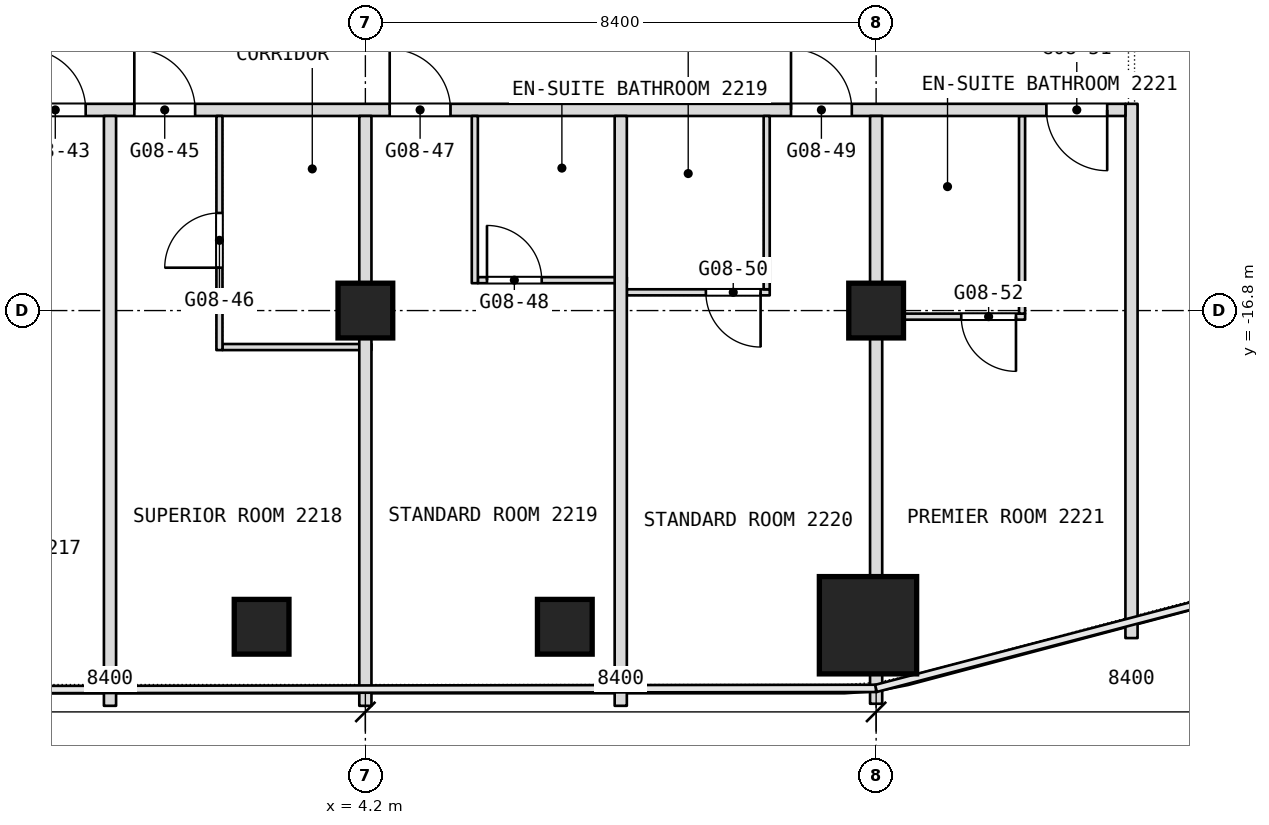
"""IFC4 building model, lengths in metres.
Left out: names, types, materials, properties, quantities, classifications, styles, units other than length and angle.
Written with IfcOpenShell. Run it as: python <this file> out.ifc"""

import sys

from ifc_helpers import new_model, si_unit, direction, frame, frame_2d, origin, origin_2d, place, context, subcontext, project, spatial, rectangle, extrude, element, fill, save


model = new_model("IFC4")
c1 = context("Model", 3, precision=1e-05, world=origin(), true_north=direction((0.0, 1.0)))
c2 = subcontext(c1, "Body", "Model", "MODEL_VIEW")
j1 = project(units=[si_unit("LENGTHUNIT", "METRE"), si_unit("PLANEANGLEUNIT", "RADIAN")], contexts=[c1])
p1 = place(None, origin())
s1 = spatial("IfcSite", under=j1, at=p1, CompositionType="ELEMENT")
p2 = place(p1, origin())
s2 = spatial("IfcBuilding", under=s1, at=p2, CompositionType="ELEMENT")
p3 = place(p2, frame((0.0, 0.0, 104.9)))
s3 = spatial("IfcBuildingStorey", under=s2, at=p3, CompositionType="ELEMENT", Elevation=104.9)
p4 = place(p3, frame((12.466, -21.975, 0.0), z_axis=(0.0, 0.0, 1.0), x_axis=(1.0, 0.0, 0.0)))
e1 = element("IfcColumn", 1, at=p4, inside=s3, PredefinedType="COLUMN", context=c2, shape_type="SweptSolid", body=[
    extrude(rectangle(XDim=1.6, YDim=1.6, at=origin_2d()), origin(), (0.0, 0.0, 1.0), 3.6),
])
for number, where, z_axis, x_axis in (
    (2, (4.2, -16.8, 0.0), (0.0, 0.0, 1.0), (1.0, 0.0, 0.0)),
    (3, (12.6, -16.8, 0.0), (0.0, 0.0, 1.0), (1.0, 0.0, 0.0)),
    (4, (7.48, -22.0, 0.0), (0.0, 0.0, 1.0), (1.0, 0.0, 0.0)),
    (5, (2.493, -22.0, 0.0), (0.0, 0.0, 1.0), (1.0, 0.0, 0.0)),
):
    element("IfcColumn", number, at=place(p3, frame(where, z_axis=z_axis, x_axis=x_axis)), inside=s3, PredefinedType="COLUMN", context=c2, shape_type="SweptSolid", body=[
        extrude(rectangle(XDim=0.9, YDim=0.9, at=origin_2d()), origin(), (0.0, 0.0, 1.0), 3.6),
    ])
p5 = place(p3, frame((1.85, -17.4, 0.0), z_axis=(0.0, 0.0, 1.0), x_axis=(1.0, 0.0, 0.0)))
e6 = element("IfcWall", 6, at=p5, inside=s3, PredefinedType="PARTITIONING", context=c2, shape_type="SweptSolid", body=[
    extrude(rectangle(XDim=2.45, YDim=0.1, at=frame_2d((1.225, 0.0))), origin(), (0.0, 0.0, 1.0), 3.34),
])
p6 = place(p3, frame((12.7, -16.9, 0.0), z_axis=(0.0, 0.0, 1.0), x_axis=(1.0, 0.0, 0.0)))
e7 = element("IfcWall", 7, at=p6, inside=s3, PredefinedType="PARTITIONING", context=c2, shape_type="SweptSolid", body=[
    extrude(rectangle(XDim=2.35, YDim=0.1, at=frame_2d((1.175, 0.0))), origin(), (0.0, 0.0, 1.0), 2.89),
])
p7 = place(p6, frame((1.3, 0.0, 0.0)))
e8 = element("IfcOpeningElement", 8, at=p7, cuts=e7, PredefinedType="OPENING", context=c2, shape_type="SweptSolid", body=[
    extrude(rectangle(XDim=0.9, YDim=2.1, at=frame_2d((0.45, 1.05))), frame((0.0, 0.05, 0.0), z_axis=(0.0, -1.0, 0.0), x_axis=(1.0, 0.0, 0.0)), (0.0, 0.0, 1.0), 0.1),
])
p8 = place(p3, frame((16.8, -22.186, 0.0), z_axis=(0.0, 0.0, 1.0), x_axis=(0.0, 1.0, 0.0)))
e9 = element("IfcWall", 9, at=p8, inside=s3, PredefinedType="PARTITIONING", context=c2, shape_type="SweptSolid", body=[
    extrude(rectangle(XDim=8.786, YDim=0.2, at=frame_2d((4.393, 0.0))), origin(), (0.0, 0.0, 1.0), 3.34),
])
p9 = place(p3, frame((8.5, -16.5, 0.0), z_axis=(0.0, 0.0, 1.0), x_axis=(1.0, 0.0, 0.0)))
e10 = element("IfcWall", 10, at=p9, inside=s3, PredefinedType="PARTITIONING", context=c2, shape_type="SweptSolid", body=[
    extrude(rectangle(XDim=2.35, YDim=0.1, at=frame_2d((1.175, 0.0))), origin(), (0.0, 0.0, 1.0), 3.34),
])
p10 = place(p9, frame((1.3, 0.0, 0.0)))
e11 = element("IfcOpeningElement", 11, at=p10, cuts=e10, PredefinedType="OPENING", context=c2, shape_type="SweptSolid", body=[
    extrude(rectangle(XDim=0.9, YDim=2.1, at=frame_2d((0.45, 1.05))), frame((0.0, 0.05, 0.0), z_axis=(0.0, -1.0, 0.0), x_axis=(1.0, 0.0, 0.0)), (0.0, 0.0, 1.0), 0.1),
])
p11 = place(p3, frame((6.05, -16.3, 0.0), z_axis=(0.0, 0.0, 1.0), x_axis=(1.0, 0.0, 0.0)))
e12 = element("IfcWall", 12, at=p11, inside=s3, PredefinedType="PARTITIONING", context=c2, shape_type="SweptSolid", body=[
    extrude(rectangle(XDim=2.45, YDim=0.1, at=frame_2d((1.225, 0.0))), origin(), (0.0, 0.0, 1.0), 3.34),
])
p12 = place(p11, frame((0.15, 0.0, 0.0)))
e13 = element("IfcOpeningElement", 13, at=p12, cuts=e12, PredefinedType="OPENING", context=c2, shape_type="SweptSolid", body=[
    extrude(rectangle(XDim=0.9, YDim=2.1, at=frame_2d((0.45, 1.05))), frame((0.0, 0.05, 0.0), z_axis=(0.0, -1.0, 0.0), x_axis=(1.0, 0.0, 0.0)), (0.0, 0.0, 1.0), 0.1),
])
p13 = place(p3, frame((15.0, -16.85, 0.0), z_axis=(0.0, 0.0, 1.0), x_axis=(0.0, 1.0, 0.0)))
e14 = element("IfcWall", 14, at=p13, inside=s3, PredefinedType="PARTITIONING", context=c2, shape_type="SweptSolid", body=[
    extrude(rectangle(XDim=3.25, YDim=0.1, at=frame_2d((1.625, 0.0))), origin(), (0.0, 0.0, 1.0), 3.34),
])
p14 = place(p3, frame((-3.2, -13.5, 0.0), z_axis=(0.0, 0.0, 1.0), x_axis=(1.0, 0.0, 0.0)))
e15 = element("IfcWall", 15, at=p14, inside=s3, PredefinedType="PARTITIONING", context=c2, shape_type="SweptSolid", body=[
    extrude(rectangle(XDim=19.9, YDim=0.2, at=frame_2d((9.95, 0.0))), origin(), (0.0, 0.0, 1.0), 3.34),
])
p15 = place(p14, frame((1.8, 0.0, 0.0)))
e16 = element("IfcOpeningElement", 16, at=p15, cuts=e15, PredefinedType="OPENING", context=c2, shape_type="SweptSolid", body=[
    extrude(rectangle(XDim=1.0, YDim=2.1, at=frame_2d((0.5, 1.05))), frame((0.0, 0.1, 0.0), z_axis=(0.0, -1.0, 0.0), x_axis=(1.0, 0.0, 0.0)), (0.0, 0.0, 1.0), 0.2),
])
p16 = place(p14, frame((3.6, 0.0, 0.0)))
e17 = element("IfcOpeningElement", 17, at=p16, cuts=e15, PredefinedType="OPENING", context=c2, shape_type="SweptSolid", body=[
    extrude(rectangle(XDim=1.0, YDim=2.1, at=frame_2d((0.5, 1.05))), frame((0.0, 0.1, 0.0), z_axis=(0.0, -1.0, 0.0), x_axis=(1.0, 0.0, 0.0)), (0.0, 0.0, 1.0), 0.2),
])
p17 = place(p14, frame((7.8, 0.0, 0.0)))
e18 = element("IfcOpeningElement", 18, at=p17, cuts=e15, PredefinedType="OPENING", context=c2, shape_type="SweptSolid", body=[
    extrude(rectangle(XDim=1.0, YDim=2.1, at=frame_2d((0.5, 1.05))), frame((0.0, 0.1, 0.0), z_axis=(0.0, -1.0, 0.0), x_axis=(1.0, 0.0, 0.0)), (0.0, 0.0, 1.0), 0.2),
])
p18 = place(p14, frame((14.4, 0.0, 0.0)))
e19 = element("IfcOpeningElement", 19, at=p18, cuts=e15, PredefinedType="OPENING", context=c2, shape_type="SweptSolid", body=[
    extrude(rectangle(XDim=1.0, YDim=2.1, at=frame_2d((0.5, 1.05))), frame((0.0, 0.1, 0.0), z_axis=(0.0, -1.0, 0.0), x_axis=(1.0, 0.0, 0.0)), (0.0, 0.0, 1.0), 0.2),
])
p19 = place(p14, frame((18.6, 0.0, 0.0)))
e20 = element("IfcOpeningElement", 20, at=p19, cuts=e15, PredefinedType="OPENING", context=c2, shape_type="SweptSolid", body=[
    extrude(rectangle(XDim=1.0, YDim=2.1, at=frame_2d((0.5, 1.05))), frame((0.0, 0.1, 0.0), z_axis=(0.0, -1.0, 0.0), x_axis=(1.0, 0.0, 0.0)), (0.0, 0.0, 1.0), 0.2),
])
p20 = place(p3, frame((12.6, -23.266, 0.0), z_axis=(0.0, 0.0, 1.0), x_axis=(0.0, 1.0, 0.0)))
e21 = element("IfcWall", 21, at=p20, inside=s3, PredefinedType="PARTITIONING", context=c2, shape_type="SweptSolid", body=[
    extrude(rectangle(XDim=0.491, YDim=0.2, at=frame_2d((0.246, 0.0))), origin(), (0.0, 0.0, 1.0), 3.34),
])
p21 = place(p3, frame((12.6, -21.175, 0.0), z_axis=(0.0, 0.0, 1.0), x_axis=(0.0, 1.0, 0.0)))
e22 = element("IfcWall", 22, at=p21, inside=s3, PredefinedType="PARTITIONING", context=c2, shape_type="SweptSolid", body=[
    extrude(rectangle(XDim=7.575, YDim=0.2, at=frame_2d((3.788, 0.0))), origin(), (0.0, 0.0, 1.0), 3.34),
])
p22 = place(p3, frame((10.8, -16.45, 0.0), z_axis=(0.0, 0.0, 1.0), x_axis=(0.0, 1.0, 0.0)))
e23 = element("IfcWall", 23, at=p22, inside=s3, PredefinedType="PARTITIONING", context=c2, shape_type="SweptSolid", body=[
    extrude(rectangle(XDim=2.85, YDim=0.1, at=frame_2d((1.425, 0.0))), origin(), (0.0, 0.0, 1.0), 3.34),
])
p23 = place(p3, frame((8.4, -23.3, 0.0), z_axis=(0.0, 0.0, 1.0), x_axis=(0.0, 1.0, 0.0)))
e24 = element("IfcWall", 24, at=p23, inside=s3, PredefinedType="PARTITIONING", context=c2, shape_type="SweptSolid", body=[
    extrude(rectangle(XDim=9.7, YDim=0.2, at=frame_2d((4.85, 0.0))), origin(), (0.0, 0.0, 1.0), 3.34),
])
p24 = place(p3, frame((6.0, -16.35, 0.0), z_axis=(0.0, 0.0, 1.0), x_axis=(0.0, 1.0, 0.0)))
e25 = element("IfcWall", 25, at=p24, inside=s3, PredefinedType="PARTITIONING", context=c2, shape_type="SweptSolid", body=[
    extrude(rectangle(XDim=2.75, YDim=0.1, at=frame_2d((1.375, 0.0))), origin(), (0.0, 0.0, 1.0), 3.34),
])
p25 = place(p3, frame((4.2, -23.3, 0.0), z_axis=(0.0, 0.0, 1.0), x_axis=(0.0, 1.0, 0.0)))
e26 = element("IfcWall", 26, at=p25, inside=s3, PredefinedType="PARTITIONING", context=c2, shape_type="SweptSolid", body=[
    extrude(rectangle(XDim=9.7, YDim=0.2, at=frame_2d((4.85, 0.0))), origin(), (0.0, 0.0, 1.0), 3.34),
])
p26 = place(p3, frame((1.8, -17.45, 0.0), z_axis=(0.0, 0.0, 1.0), x_axis=(0.0, 1.0, 0.0)))
e27 = element("IfcWall", 27, at=p26, inside=s3, PredefinedType="PARTITIONING", context=c2, shape_type="SweptSolid", body=[
    extrude(rectangle(XDim=3.85, YDim=0.1, at=frame_2d((1.925, 0.0))), origin(), (0.0, 0.0, 1.0), 3.34),
])
p27 = place(p26, frame((1.355, 0.0, 0.0)))
e28 = element("IfcOpeningElement", 28, at=p27, cuts=e27, PredefinedType="OPENING", context=c2, shape_type="SweptSolid", body=[
    extrude(rectangle(XDim=0.9, YDim=2.1, at=frame_2d((0.45, 1.05))), frame((0.0, 0.05, 0.0), z_axis=(0.0, -1.0, 0.0), x_axis=(1.0, 0.0, 0.0)), (0.0, 0.0, 1.0), 0.1),
])
p28 = place(p3, frame((0.0, -23.3, 0.0), z_axis=(0.0, 0.0, 1.0), x_axis=(0.0, 1.0, 0.0)))
e29 = element("IfcWall", 29, at=p28, inside=s3, PredefinedType="PARTITIONING", context=c2, shape_type="SweptSolid", body=[
    extrude(rectangle(XDim=9.7, YDim=0.2, at=frame_2d((4.85, 0.0))), origin(), (0.0, 0.0, 1.0), 3.34),
])
p29 = place(p7, origin())
e30 = element("IfcDoor", 30, at=p29, inside=s3, OperationType="SINGLE_SWING_RIGHT", PredefinedType="DOOR", context=c2, shape_type="SweptSolid", body=[
    extrude(rectangle(XDim=0.9, YDim=2.1, at=frame_2d((0.45, 1.05))), frame((0.0, 0.025, 0.0), z_axis=(0.0, -1.0, 0.0), x_axis=(1.0, 0.0, 0.0)), (0.0, 0.0, 1.0), 0.05),
])
fill(e8, e30)
p30 = place(p10, origin())
e31 = element("IfcDoor", 31, at=p30, inside=s3, OperationType="SINGLE_SWING_RIGHT", PredefinedType="DOOR", context=c2, shape_type="SweptSolid", body=[
    extrude(rectangle(XDim=0.9, YDim=2.1, at=frame_2d((0.45, 1.05))), frame((0.0, 0.025, 0.0), z_axis=(0.0, -1.0, 0.0), x_axis=(1.0, 0.0, 0.0)), (0.0, 0.0, 1.0), 0.05),
])
fill(e11, e31)
p31 = place(p12, origin())
e32 = element("IfcDoor", 32, at=p31, inside=s3, OperationType="SINGLE_SWING_LEFT", PredefinedType="DOOR", context=c2, shape_type="SweptSolid", body=[
    extrude(rectangle(XDim=0.9, YDim=2.1, at=frame_2d((0.45, 1.05))), frame((0.0, 0.025, 0.0), z_axis=(0.0, -1.0, 0.0), x_axis=(1.0, 0.0, 0.0)), (0.0, 0.0, 1.0), 0.05),
])
fill(e13, e32)
p32 = place(p15, origin())
e33 = element("IfcDoor", 33, at=p32, inside=s3, OperationType="SINGLE_SWING_LEFT", PredefinedType="DOOR", context=c2, shape_type="SweptSolid", body=[
    extrude(rectangle(XDim=1.0, YDim=2.1, at=frame_2d((0.5, 1.05))), frame((0.0, 0.025, 0.0), z_axis=(0.0, -1.0, 0.0), x_axis=(1.0, 0.0, 0.0)), (0.0, 0.0, 1.0), 0.05),
])
fill(e16, e33)
p33 = place(p16, origin())
e34 = element("IfcDoor", 34, at=p33, inside=s3, OperationType="SINGLE_SWING_LEFT", PredefinedType="DOOR", context=c2, shape_type="SweptSolid", body=[
    extrude(rectangle(XDim=1.0, YDim=2.1, at=frame_2d((0.5, 1.05))), frame((0.0, 0.025, 0.0), z_axis=(0.0, -1.0, 0.0), x_axis=(1.0, 0.0, 0.0)), (0.0, 0.0, 1.0), 0.05),
])
fill(e17, e34)
p34 = place(p17, origin())
e35 = element("IfcDoor", 35, at=p34, inside=s3, OperationType="SINGLE_SWING_LEFT", PredefinedType="DOOR", context=c2, shape_type="SweptSolid", body=[
    extrude(rectangle(XDim=1.0, YDim=2.1, at=frame_2d((0.5, 1.05))), frame((0.0, 0.025, 0.0), z_axis=(0.0, -1.0, 0.0), x_axis=(1.0, 0.0, 0.0)), (0.0, 0.0, 1.0), 0.05),
])
fill(e18, e35)
p35 = place(p18, origin())
e36 = element("IfcDoor", 36, at=p35, inside=s3, OperationType="SINGLE_SWING_LEFT", PredefinedType="DOOR", context=c2, shape_type="SweptSolid", body=[
    extrude(rectangle(XDim=1.0, YDim=2.1, at=frame_2d((0.5, 1.05))), frame((0.0, 0.025, 0.0), z_axis=(0.0, -1.0, 0.0), x_axis=(1.0, 0.0, 0.0)), (0.0, 0.0, 1.0), 0.05),
])
fill(e19, e36)
p36 = place(p19, origin())
e37 = element("IfcDoor", 37, at=p36, inside=s3, OperationType="SINGLE_SWING_LEFT", PredefinedType="DOOR", context=c2, shape_type="SweptSolid", body=[
    extrude(rectangle(XDim=1.0, YDim=2.1, at=frame_2d((0.5, 1.05))), frame((0.0, 0.025, 0.0), z_axis=(0.0, -1.0, 0.0), x_axis=(1.0, 0.0, 0.0)), (0.0, 0.0, 1.0), 0.05),
])
fill(e20, e37)
p37 = place(p27, origin())
e38 = element("IfcDoor", 38, at=p37, inside=s3, OperationType="SINGLE_SWING_RIGHT", PredefinedType="DOOR", context=c2, shape_type="SweptSolid", body=[
    extrude(rectangle(XDim=0.9, YDim=2.1, at=frame_2d((0.45, 1.05))), frame((0.0, 0.025, 0.0), z_axis=(0.0, -1.0, 0.0), x_axis=(1.0, 0.0, 0.0)), (0.0, 0.0, 1.0), 0.05),
])
fill(e28, e38)
save(model, sys.argv[1])
